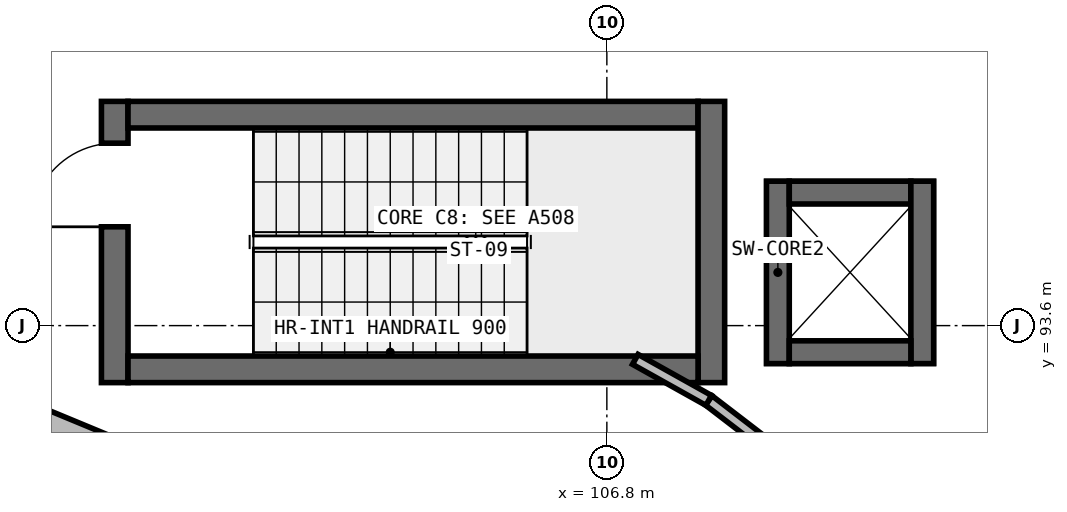
"""IFC4 building model, lengths in metres.
Left out: names, types, materials, properties, quantities, classifications, styles, units other than length and angle.
Written with IfcOpenShell. Run it as: python <this file> out.ifc"""

import sys

from ifc_helpers import new_model, si_unit, direction, frame, frame_2d, origin, place, context, subcontext, project, spatial, rectangle, extrude, element, fill, save


model = new_model("IFC4")
c1 = context("Model", 3, precision=1e-05, world=origin(), true_north=direction((0.0, 1.0)))
c2 = subcontext(c1, "Body", "Model", "MODEL_VIEW")
j1 = project(units=[si_unit("LENGTHUNIT", "METRE"), si_unit("PLANEANGLEUNIT", "RADIAN")], contexts=[c1])
p1 = place(None, origin())
s1 = spatial("IfcSite", under=j1, at=p1, CompositionType="ELEMENT")
p2 = place(p1, origin())
s2 = spatial("IfcBuilding", under=s1, at=p2, CompositionType="ELEMENT")
p3 = place(p2, frame((0.0, 0.0, 14.35)))
s3 = spatial("IfcBuildingStorey", under=s2, at=p3, CompositionType="ELEMENT", Elevation=14.35)
p4 = place(p3, frame((100.325, 92.85, 0.0), z_axis=(0.0, 0.0, 1.0), x_axis=(0.0, 1.0, 0.0)))
e1 = element("IfcWall", 1, at=p4, inside=s3, PredefinedType="SHEAR", context=c2, shape_type="SweptSolid", body=[
    extrude(rectangle(XDim=3.7, YDim=0.35, at=frame_2d((1.85, 0.0))), origin(), (0.0, 0.0, 1.0), 4.55),
])
p5 = place(p4, frame((2.05, 0.0, 0.0)))
e2 = element("IfcOpeningElement", 2, at=p5, cuts=e1, PredefinedType="OPENING", context=c2, shape_type="SweptSolid", body=[
    extrude(rectangle(XDim=1.1, YDim=2.15, at=frame_2d((0.55, 1.075))), frame((0.0, 0.185, 0.0), z_axis=(0.0, -1.0, 0.0), x_axis=(1.0, 0.0, 0.0)), (0.0, 0.0, 1.0), 0.37),
])
p6 = place(p3, frame((100.5, 96.375, 0.0), z_axis=(0.0, 0.0, 1.0), x_axis=(1.0, 0.0, 0.0)))
e3 = element("IfcWall", 3, at=p6, inside=s3, PredefinedType="SHEAR", context=c2, shape_type="SweptSolid", body=[
    extrude(rectangle(XDim=7.5, YDim=0.35, at=frame_2d((3.75, 0.0))), origin(), (0.0, 0.0, 1.0), 4.55),
])
p7 = place(p3, frame((108.175, 96.55, 0.0), z_axis=(0.0, 0.0, 1.0), x_axis=(0.0, -1.0, 0.0)))
e4 = element("IfcWall", 4, at=p7, inside=s3, PredefinedType="SHEAR", context=c2, shape_type="SweptSolid", body=[
    extrude(rectangle(XDim=3.7, YDim=0.35, at=frame_2d((1.85, 0.0))), origin(), (0.0, 0.0, 1.0), 4.55),
])
p8 = place(p3, frame((108.0, 93.025, 0.0), z_axis=(0.0, 0.0, 1.0), x_axis=(-1.0, 0.0, 0.0)))
e5 = element("IfcWall", 5, at=p8, inside=s3, PredefinedType="SHEAR", context=c2, shape_type="SweptSolid", body=[
    extrude(rectangle(XDim=7.5, YDim=0.35, at=frame_2d((3.75, 0.0))), origin(), (0.0, 0.0, 1.0), 4.55),
])
p9 = place(p3, frame((109.05, 93.1, 0.0), z_axis=(0.0, 0.0, 1.0), x_axis=(0.0, 1.0, 0.0)))
e6 = element("IfcWall", 6, at=p9, inside=s3, PredefinedType="SHEAR", context=c2, shape_type="SweptSolid", body=[
    extrude(rectangle(XDim=2.4, YDim=0.3, at=frame_2d((1.2, 0.0))), origin(), (0.0, 0.0, 1.0), 4.37),
])
p10 = place(p3, frame((109.2, 95.35, 0.0), z_axis=(0.0, 0.0, 1.0), x_axis=(1.0, 0.0, 0.0)))
e7 = element("IfcWall", 7, at=p10, inside=s3, PredefinedType="SHEAR", context=c2, shape_type="SweptSolid", body=[
    extrude(rectangle(XDim=1.6, YDim=0.3, at=frame_2d((0.8, 0.0))), origin(), (0.0, 0.0, 1.0), 4.37),
])
p11 = place(p3, frame((110.95, 95.5, 0.0), z_axis=(0.0, 0.0, 1.0), x_axis=(0.0, -1.0, 0.0)))
e8 = element("IfcWall", 8, at=p11, inside=s3, PredefinedType="SHEAR", context=c2, shape_type="SweptSolid", body=[
    extrude(rectangle(XDim=2.4, YDim=0.3, at=frame_2d((1.2, 0.0))), origin(), (0.0, 0.0, 1.0), 4.37),
])
p12 = place(p3, frame((110.8, 93.25, 0.0), z_axis=(0.0, 0.0, 1.0), x_axis=(-1.0, 0.0, 0.0)))
e9 = element("IfcWall", 9, at=p12, inside=s3, PredefinedType="SHEAR", context=c2, shape_type="SweptSolid", body=[
    extrude(rectangle(XDim=1.6, YDim=0.3, at=frame_2d((0.8, 0.0))), origin(), (0.0, 0.0, 1.0), 4.37),
])
p13 = place(p3, frame((106.325, 89.483, 0.0), z_axis=(0.0, 0.0, 1.0), x_axis=(-0.92385889973, 0.382733240508, 0.0)))
e10 = element("IfcWall", 10, at=p13, inside=s3, PredefinedType="SOLIDWALL", context=c2, shape_type="SweptSolid", body=[
    extrude(rectangle(XDim=10.081, YDim=0.29, at=frame_2d((5.04, 0.0))), origin(), (0.0, 0.0, 1.0), 4.37),
])
p14 = place(p13, frame((3.855, 0.0, 0.95)))
e11 = element("IfcOpeningElement", 11, at=p14, cuts=e10, PredefinedType="OPENING", context=c2, shape_type="SweptSolid", body=[
    extrude(rectangle(XDim=2.37, YDim=1.59, at=frame_2d((1.185, 0.795))), frame((0.0, 0.155, 0.0), z_axis=(0.0, -1.0, 0.0), x_axis=(1.0, 0.0, 0.0)), (0.0, 0.0, 1.0), 0.31),
])
p15 = place(p3, frame((96.748, 92.366, 0.0), z_axis=(0.0, 0.0, 1.0), x_axis=(0.923848052238, -0.382759423628, 0.0)))
e12 = element("IfcWall", 12, at=p15, inside=s3, PredefinedType="SOLIDWALL", context=c2, shape_type="SweptSolid", body=[
    extrude(rectangle(XDim=9.821, YDim=0.29, at=frame_2d((4.91, 0.0))), origin(), (0.0, 0.0, 1.0), 4.37),
])
p16 = place(p15, frame((1.6, 0.0, 0.95)))
e13 = element("IfcOpeningElement", 13, at=p16, cuts=e12, PredefinedType="OPENING", context=c2, shape_type="SweptSolid", body=[
    extrude(rectangle(XDim=1.71, YDim=1.8, at=frame_2d((0.855, 0.9))), frame((0.0, 0.155, 0.0), z_axis=(0.0, -1.0, 0.0), x_axis=(1.0, 0.0, 0.0)), (0.0, 0.0, 1.0), 0.31),
])
p17 = place(p15, frame((6.511, 0.0, 0.95)))
e14 = element("IfcOpeningElement", 14, at=p17, cuts=e12, PredefinedType="OPENING", context=c2, shape_type="SweptSolid", body=[
    extrude(rectangle(XDim=1.71, YDim=1.8, at=frame_2d((0.855, 0.9))), frame((0.0, 0.155, 0.0), z_axis=(0.0, -1.0, 0.0), x_axis=(1.0, 0.0, 0.0)), (0.0, 0.0, 1.0), 0.31),
])
p18 = place(p3, frame((116.896, 85.896, 0.0), z_axis=(0.0, 0.0, 1.0), x_axis=(-0.793301872689, 0.608828497024, 0.0)))
e15 = element("IfcWall", 15, at=p18, inside=s3, PredefinedType="PARTITIONING", context=c2, shape_type="SweptSolid", body=[
    extrude(rectangle(XDim=11.038, YDim=0.15, at=frame_2d((5.519, 0.0))), origin(), (0.0, 0.0, 1.0), 3.738),
])
p19 = place(p18, frame((4.95, 0.0, 0.0)))
e16 = element("IfcOpeningElement", 16, at=p19, cuts=e15, PredefinedType="OPENING", context=c2, shape_type="SweptSolid", body=[
    extrude(rectangle(XDim=1.1, YDim=2.2, at=frame_2d((0.55, 1.1))), frame((0.0, 0.085, 0.0), z_axis=(0.0, -1.0, 0.0), x_axis=(1.0, 0.0, 0.0)), (0.0, 0.0, 1.0), 0.17),
])
p20 = place(p3, frame((108.14, 92.616, 0.0), z_axis=(0.0, 0.0, 1.0), x_axis=(-0.872821867213, 0.488038920697, 0.0)))
e17 = element("IfcWall", 17, at=p20, inside=s3, PredefinedType="PARTITIONING", context=c2, shape_type="SweptSolid", body=[
    extrude(rectangle(XDim=1.106, YDim=0.15, at=frame_2d((0.553, 0.0))), origin(), (0.0, 0.0, 1.0), 4.3),
])
p21 = place(p3, frame((97.943, 96.839, 0.0), z_axis=(0.0, 0.0, 1.0), x_axis=(0.258832719409, 0.965922162166, 0.0)))
e18 = element("IfcWall", 18, at=p21, inside=s3, PredefinedType="PARTITIONING", context=c2, shape_type="SweptSolid", body=[
    extrude(rectangle(XDim=6.44, YDim=0.15, at=frame_2d((3.22, 0.0))), origin(), (0.0, 0.0, 1.0), 3.738),
])
p22 = place(p5, origin())
e19 = element("IfcDoor", 19, at=p22, inside=s3, OperationType="SINGLE_SWING_LEFT", PredefinedType="DOOR", context=c2, shape_type="SweptSolid", body=[
    extrude(rectangle(XDim=1.1, YDim=2.15, at=frame_2d((0.55, 1.075))), frame((0.0, 0.025, 0.0), z_axis=(0.0, -1.0, 0.0), x_axis=(1.0, 0.0, 0.0)), (0.0, 0.0, 1.0), 0.05),
])
fill(e2, e19)
save(model, sys.argv[1])
